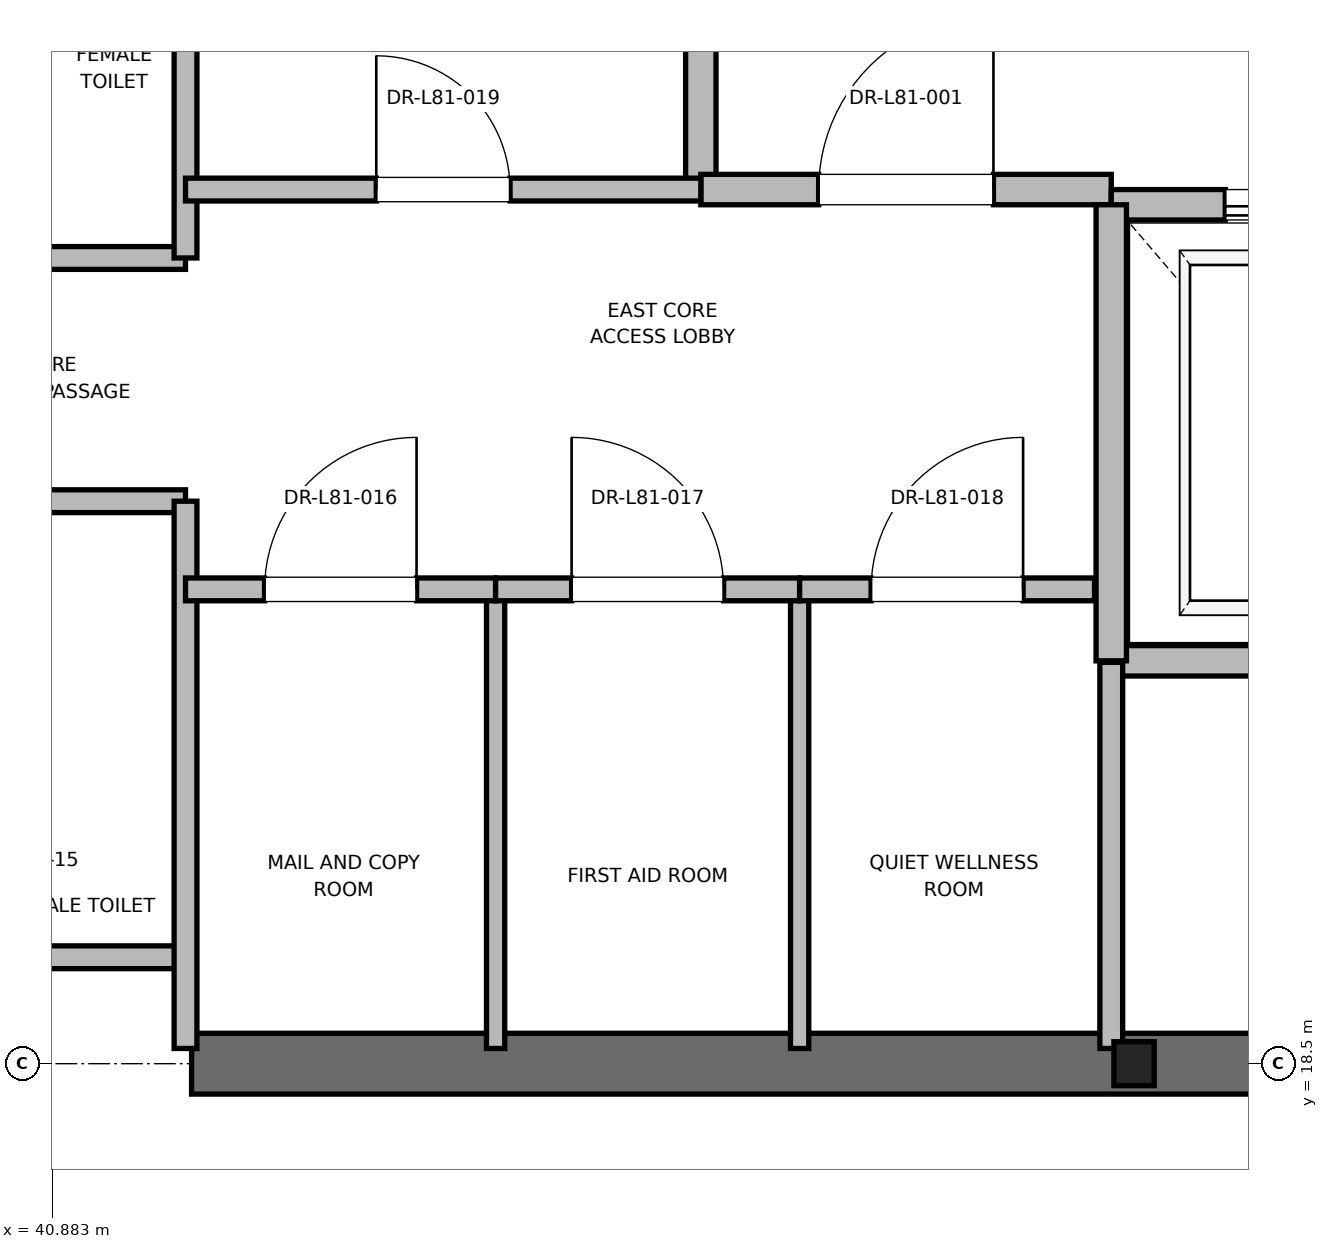
"""IFC4 building model, lengths in metres.
Left out: names, types, materials, properties, quantities, classifications, styles, units other than length and angle.
Written with IfcOpenShell. Run it as: python <this file> out.ifc"""

import sys

from ifc_helpers import new_model, si_unit, direction, frame, frame_2d, origin, origin_2d, place, context, subcontext, project, spatial, rectangle, i_section, extrude, element, fill, save


model = new_model("IFC4")
c1 = context("Model", 3, precision=1e-05, world=origin(), true_north=direction((0.0, 1.0)))
c2 = subcontext(c1, "Body", "Model", "MODEL_VIEW")
j1 = project(units=[si_unit("LENGTHUNIT", "METRE"), si_unit("PLANEANGLEUNIT", "RADIAN")], contexts=[c1])
p1 = place(None, origin())
s1 = spatial("IfcSite", under=j1, at=p1, CompositionType="ELEMENT")
p2 = place(p1, origin())
s2 = spatial("IfcBuilding", under=s1, at=p2, CompositionType="ELEMENT")
p3 = place(p2, frame((0.0, 0.0, 348.8)))
s3 = spatial("IfcBuildingStorey", under=s2, at=p3, CompositionType="ELEMENT", Elevation=348.8)
p4 = place(p3, frame((48.0, 18.5, 0.0), z_axis=(0.0, 0.0, 1.0), x_axis=(1.0, 0.0, 0.0)))
e1 = element("IfcColumn", 1, at=p4, inside=s3, PredefinedType="COLUMN", context=c2, shape_type="SweptSolid", body=[
    extrude(i_section(OverallWidth=0.265, OverallDepth=0.289, WebThickness=0.019, FlangeThickness=0.032, FilletRadius=0.013, at=origin_2d()), origin(), (0.0, 0.0, 1.0), 5.5),
])
p5 = place(p3, frame((41.8, 18.5, 0.0), z_axis=(0.0, 0.0, 1.0), x_axis=(1.0, 0.0, 0.0)))
e2 = element("IfcWall", 2, at=p5, inside=s3, PredefinedType="SHEAR", context=c2, shape_type="SweptSolid", body=[
    extrude(rectangle(XDim=9.2, YDim=0.4, at=frame_2d((4.6, 0.0))), origin(), (0.0, 0.0, 1.0), 5.2),
])
p6 = place(p3, frame((45.15, 24.25, 0.0), z_axis=(0.0, 0.0, 1.0), x_axis=(0.0, 1.0, 0.0)))
e3 = element("IfcWall", 3, at=p6, inside=s3, PredefinedType="PARTITIONING", context=c2, shape_type="SweptSolid", body=[
    extrude(rectangle(XDim=3.37, YDim=0.2, at=frame_2d((1.685, 0.0))), origin(), (0.0, 0.0, 1.0), 5.2),
])
p7 = place(p3, frame((45.15, 24.25, 0.0), z_axis=(0.0, 0.0, 1.0), x_axis=(1.0, 0.0, 0.0)))
e4 = element("IfcWall", 4, at=p7, inside=s3, PredefinedType="PARTITIONING", context=c2, shape_type="SweptSolid", body=[
    extrude(rectangle(XDim=2.7, YDim=0.2, at=frame_2d((1.35, 0.0))), origin(), (0.0, 0.0, 1.0), 5.2),
])
p8 = place(p7, frame((0.775, 0.0, 0.0)))
e5 = element("IfcOpeningElement", 5, at=p8, cuts=e4, PredefinedType="OPENING", context=c2, shape_type="SweptSolid", body=[
    extrude(rectangle(XDim=1.15, YDim=2.2, at=frame_2d((0.575, 1.1))), frame((0.0, 0.1, 0.0), z_axis=(0.0, -1.0, 0.0), x_axis=(1.0, 0.0, 0.0)), (0.0, 0.0, 1.0), 0.2),
])
p9 = place(p3, frame((47.85, 21.15, 0.0), z_axis=(0.0, 0.0, 1.0), x_axis=(1.0, 0.0, 0.0)))
e6 = element("IfcWall", 6, at=p9, inside=s3, PredefinedType="SOLIDWALL", context=c2, shape_type="SweptSolid", body=[
    extrude(rectangle(XDim=2.6, YDim=0.2, at=frame_2d((1.3, 0.0))), origin(), (0.0, 0.0, 1.0), 5.2),
])
p10 = place(p3, frame((50.45, 24.15, 0.0), z_axis=(0.0, 0.0, 1.0), x_axis=(-1.0, 0.0, 0.0)))
e7 = element("IfcWall", 7, at=p10, inside=s3, PredefinedType="SOLIDWALL", context=c2, shape_type="SweptSolid", body=[
    extrude(rectangle(XDim=2.6, YDim=0.2, at=frame_2d((1.3, 0.0))), origin(), (0.0, 0.0, 1.0), 4.28),
])
p11 = place(p10, frame((0.75, 0.0, 0.0)))
e8 = element("IfcOpeningElement", 8, at=p11, cuts=e7, PredefinedType="OPENING", context=c2, shape_type="SweptSolid", body=[
    extrude(rectangle(XDim=1.1, YDim=2.2, at=frame_2d((0.55, 1.1))), frame((0.0, 0.1, 0.0), z_axis=(0.0, -1.0, 0.0), x_axis=(1.0, 0.0, 0.0)), (0.0, 0.0, 1.0), 0.2),
])
p12 = place(p3, frame((47.85, 24.15, 0.0), z_axis=(0.0, 0.0, 1.0), x_axis=(0.0, -1.0, 0.0)))
e9 = element("IfcWall", 9, at=p12, inside=s3, PredefinedType="SOLIDWALL", context=c2, shape_type="SweptSolid", body=[
    extrude(rectangle(XDim=3.0, YDim=0.2, at=frame_2d((1.5, 0.0))), origin(), (0.0, 0.0, 1.0), 5.2),
])
for number, where, z_axis, x_axis in (
    (10, (39.95, 19.2, 0.0), (0.0, 0.0, 1.0), (1.0, 0.0, 0.0)),
    (11, (39.95, 22.2, 0.0), (0.0, 0.0, 1.0), (1.0, 0.0, 0.0)),
    (12, (39.95, 23.8, 0.0), (0.0, 0.0, 1.0), (1.0, 0.0, 0.0)),
):
    element("IfcWall", number, at=place(p3, frame(where, z_axis=z_axis, x_axis=x_axis)), inside=s3, PredefinedType="PARTITIONING", context=c2, shape_type="SweptSolid", body=[
        extrude(rectangle(XDim=1.81, YDim=0.15, at=frame_2d((0.905, 0.0))), origin(), (0.0, 0.0, 1.0), 2.85),
    ])
p13 = place(p3, frame((41.76, 18.6, 0.0), z_axis=(0.0, 0.0, 1.0), x_axis=(0.0, 1.0, 0.0)))
e13 = element("IfcWall", 13, at=p13, inside=s3, PredefinedType="PARTITIONING", context=c2, shape_type="SweptSolid", body=[
    extrude(rectangle(XDim=3.6, YDim=0.15, at=frame_2d((1.8, 0.0))), origin(), (0.0, 0.0, 1.0), 2.85),
])
p14 = place(p3, frame((41.76, 23.8, 0.0), z_axis=(0.0, 0.0, 1.0), x_axis=(0.0, 1.0, 0.0)))
e14 = element("IfcWall", 14, at=p14, inside=s3, PredefinedType="PARTITIONING", context=c2, shape_type="SweptSolid", body=[
    extrude(rectangle(XDim=4.0, YDim=0.15, at=frame_2d((2.0, 0.0))), origin(), (0.0, 0.0, 1.0), 2.85),
])
p15 = place(p3, frame((47.85, 18.6, 0.0), z_axis=(0.0, 0.0, 1.0), x_axis=(0.0, 1.0, 0.0)))
e15 = element("IfcWall", 15, at=p15, inside=s3, PredefinedType="PARTITIONING", context=c2, shape_type="SweptSolid", body=[
    extrude(rectangle(XDim=2.54, YDim=0.15, at=frame_2d((1.27, 0.0))), origin(), (0.0, 0.0, 1.0), 2.85),
])
for number, where, z_axis, x_axis in (
    (16, (43.8, 18.6, 0.0), (0.0, 0.0, 1.0), (0.0, 1.0, 0.0)),
    (17, (45.8, 18.6, 0.0), (0.0, 0.0, 1.0), (0.0, 1.0, 0.0)),
):
    element("IfcWall", number, at=place(p3, frame(where, z_axis=z_axis, x_axis=x_axis)), inside=s3, PredefinedType="PARTITIONING", context=c2, shape_type="SweptSolid", body=[
        extrude(rectangle(XDim=3.02, YDim=0.12, at=frame_2d((1.51, 0.0))), origin(), (0.0, 0.0, 1.0), 2.85),
    ])
p16 = place(p3, frame((41.76, 21.62, 0.0), z_axis=(0.0, 0.0, 1.0), x_axis=(1.0, 0.0, 0.0)))
e18 = element("IfcWall", 18, at=p16, inside=s3, PredefinedType="PARTITIONING", context=c2, shape_type="SweptSolid", body=[
    extrude(rectangle(XDim=2.04, YDim=0.15, at=frame_2d((1.02, 0.0))), origin(), (0.0, 0.0, 1.0), 2.85),
])
p17 = place(p16, frame((0.52, 0.0, 0.0)))
e19 = element("IfcOpeningElement", 19, at=p17, cuts=e18, PredefinedType="OPENING", context=c2, shape_type="SweptSolid", body=[
    extrude(rectangle(XDim=1.0, YDim=2.15, at=frame_2d((0.5, 1.075))), frame((0.0, 0.075, 0.0), z_axis=(0.0, -1.0, 0.0), x_axis=(1.0, 0.0, 0.0)), (0.0, 0.0, 1.0), 0.15),
])
p18 = place(p3, frame((43.8, 21.62, 0.0), z_axis=(0.0, 0.0, 1.0), x_axis=(1.0, 0.0, 0.0)))
e20 = element("IfcWall", 20, at=p18, inside=s3, PredefinedType="PARTITIONING", context=c2, shape_type="SweptSolid", body=[
    extrude(rectangle(XDim=2.0, YDim=0.15, at=frame_2d((1.0, 0.0))), origin(), (0.0, 0.0, 1.0), 2.85),
])
p19 = place(p18, frame((0.5, 0.0, 0.0)))
e21 = element("IfcOpeningElement", 21, at=p19, cuts=e20, PredefinedType="OPENING", context=c2, shape_type="SweptSolid", body=[
    extrude(rectangle(XDim=1.0, YDim=2.15, at=frame_2d((0.5, 1.075))), frame((0.0, 0.075, 0.0), z_axis=(0.0, -1.0, 0.0), x_axis=(1.0, 0.0, 0.0)), (0.0, 0.0, 1.0), 0.15),
])
p20 = place(p3, frame((45.8, 21.62, 0.0), z_axis=(0.0, 0.0, 1.0), x_axis=(1.0, 0.0, 0.0)))
e22 = element("IfcWall", 22, at=p20, inside=s3, PredefinedType="PARTITIONING", context=c2, shape_type="SweptSolid", body=[
    extrude(rectangle(XDim=1.94, YDim=0.15, at=frame_2d((0.97, 0.0))), origin(), (0.0, 0.0, 1.0), 2.85),
])
p21 = place(p20, frame((0.47, 0.0, 0.0)))
e23 = element("IfcOpeningElement", 23, at=p21, cuts=e22, PredefinedType="OPENING", context=c2, shape_type="SweptSolid", body=[
    extrude(rectangle(XDim=1.0, YDim=2.15, at=frame_2d((0.5, 1.075))), frame((0.0, 0.075, 0.0), z_axis=(0.0, -1.0, 0.0), x_axis=(1.0, 0.0, 0.0)), (0.0, 0.0, 1.0), 0.15),
])
p22 = place(p3, frame((41.76, 24.25, 0.0), z_axis=(0.0, 0.0, 1.0), x_axis=(1.0, 0.0, 0.0)))
e24 = element("IfcWall", 24, at=p22, inside=s3, PredefinedType="PARTITIONING", context=c2, shape_type="SweptSolid", body=[
    extrude(rectangle(XDim=3.39, YDim=0.15, at=frame_2d((1.695, 0.0))), origin(), (0.0, 0.0, 1.0), 2.85),
])
p23 = place(p22, frame((1.255, 0.0, 0.0)))
e25 = element("IfcOpeningElement", 25, at=p23, cuts=e24, PredefinedType="OPENING", context=c2, shape_type="SweptSolid", body=[
    extrude(rectangle(XDim=0.88, YDim=2.1, at=frame_2d((0.44, 1.05))), frame((0.0, 0.075, 0.0), z_axis=(0.0, -1.0, 0.0), x_axis=(1.0, 0.0, 0.0)), (0.0, 0.0, 1.0), 0.15),
])
p24 = place(p8, origin())
e26 = element("IfcDoor", 26, at=p24, inside=s3, OperationType="SINGLE_SWING_RIGHT", PredefinedType="DOOR", context=c2, shape_type="SweptSolid", body=[
    extrude(rectangle(XDim=1.15, YDim=2.2, at=frame_2d((0.575, 1.1))), frame((0.0, 0.025, 0.0), z_axis=(0.0, -1.0, 0.0), x_axis=(1.0, 0.0, 0.0)), (0.0, 0.0, 1.0), 0.05),
])
fill(e5, e26)
p25 = place(p11, origin())
e27 = element("IfcDoor", 27, at=p25, inside=s3, OperationType="SLIDING_TO_RIGHT", PredefinedType="DOOR", context=c2, shape_type="SweptSolid", body=[
    extrude(rectangle(XDim=1.1, YDim=2.2, at=frame_2d((0.55, 1.1))), frame((0.0, 0.025, 0.0), z_axis=(0.0, -1.0, 0.0), x_axis=(1.0, 0.0, 0.0)), (0.0, 0.0, 1.0), 0.05),
])
fill(e8, e27)
p26 = place(p17, origin())
e28 = element("IfcDoor", 28, at=p26, inside=s3, OperationType="SINGLE_SWING_RIGHT", PredefinedType="DOOR", context=c2, shape_type="SweptSolid", body=[
    extrude(rectangle(XDim=1.0, YDim=2.15, at=frame_2d((0.5, 1.075))), frame((0.0, 0.025, 0.0), z_axis=(0.0, -1.0, 0.0), x_axis=(1.0, 0.0, 0.0)), (0.0, 0.0, 1.0), 0.05),
])
fill(e19, e28)
p27 = place(p19, origin())
e29 = element("IfcDoor", 29, at=p27, inside=s3, OperationType="SINGLE_SWING_LEFT", PredefinedType="DOOR", context=c2, shape_type="SweptSolid", body=[
    extrude(rectangle(XDim=1.0, YDim=2.15, at=frame_2d((0.5, 1.075))), frame((0.0, 0.025, 0.0), z_axis=(0.0, -1.0, 0.0), x_axis=(1.0, 0.0, 0.0)), (0.0, 0.0, 1.0), 0.05),
])
fill(e21, e29)
p28 = place(p21, origin())
e30 = element("IfcDoor", 30, at=p28, inside=s3, OperationType="SINGLE_SWING_RIGHT", PredefinedType="DOOR", context=c2, shape_type="SweptSolid", body=[
    extrude(rectangle(XDim=1.0, YDim=2.15, at=frame_2d((0.5, 1.075))), frame((0.0, 0.025, 0.0), z_axis=(0.0, -1.0, 0.0), x_axis=(1.0, 0.0, 0.0)), (0.0, 0.0, 1.0), 0.05),
])
fill(e23, e30)
p29 = place(p23, origin())
e31 = element("IfcDoor", 31, at=p29, inside=s3, OperationType="SINGLE_SWING_LEFT", PredefinedType="DOOR", context=c2, shape_type="SweptSolid", body=[
    extrude(rectangle(XDim=0.88, YDim=2.1, at=frame_2d((0.44, 1.05))), frame((0.0, 0.025, 0.0), z_axis=(0.0, -1.0, 0.0), x_axis=(1.0, 0.0, 0.0)), (0.0, 0.0, 1.0), 0.05),
])
fill(e25, e31)
save(model, sys.argv[1])
